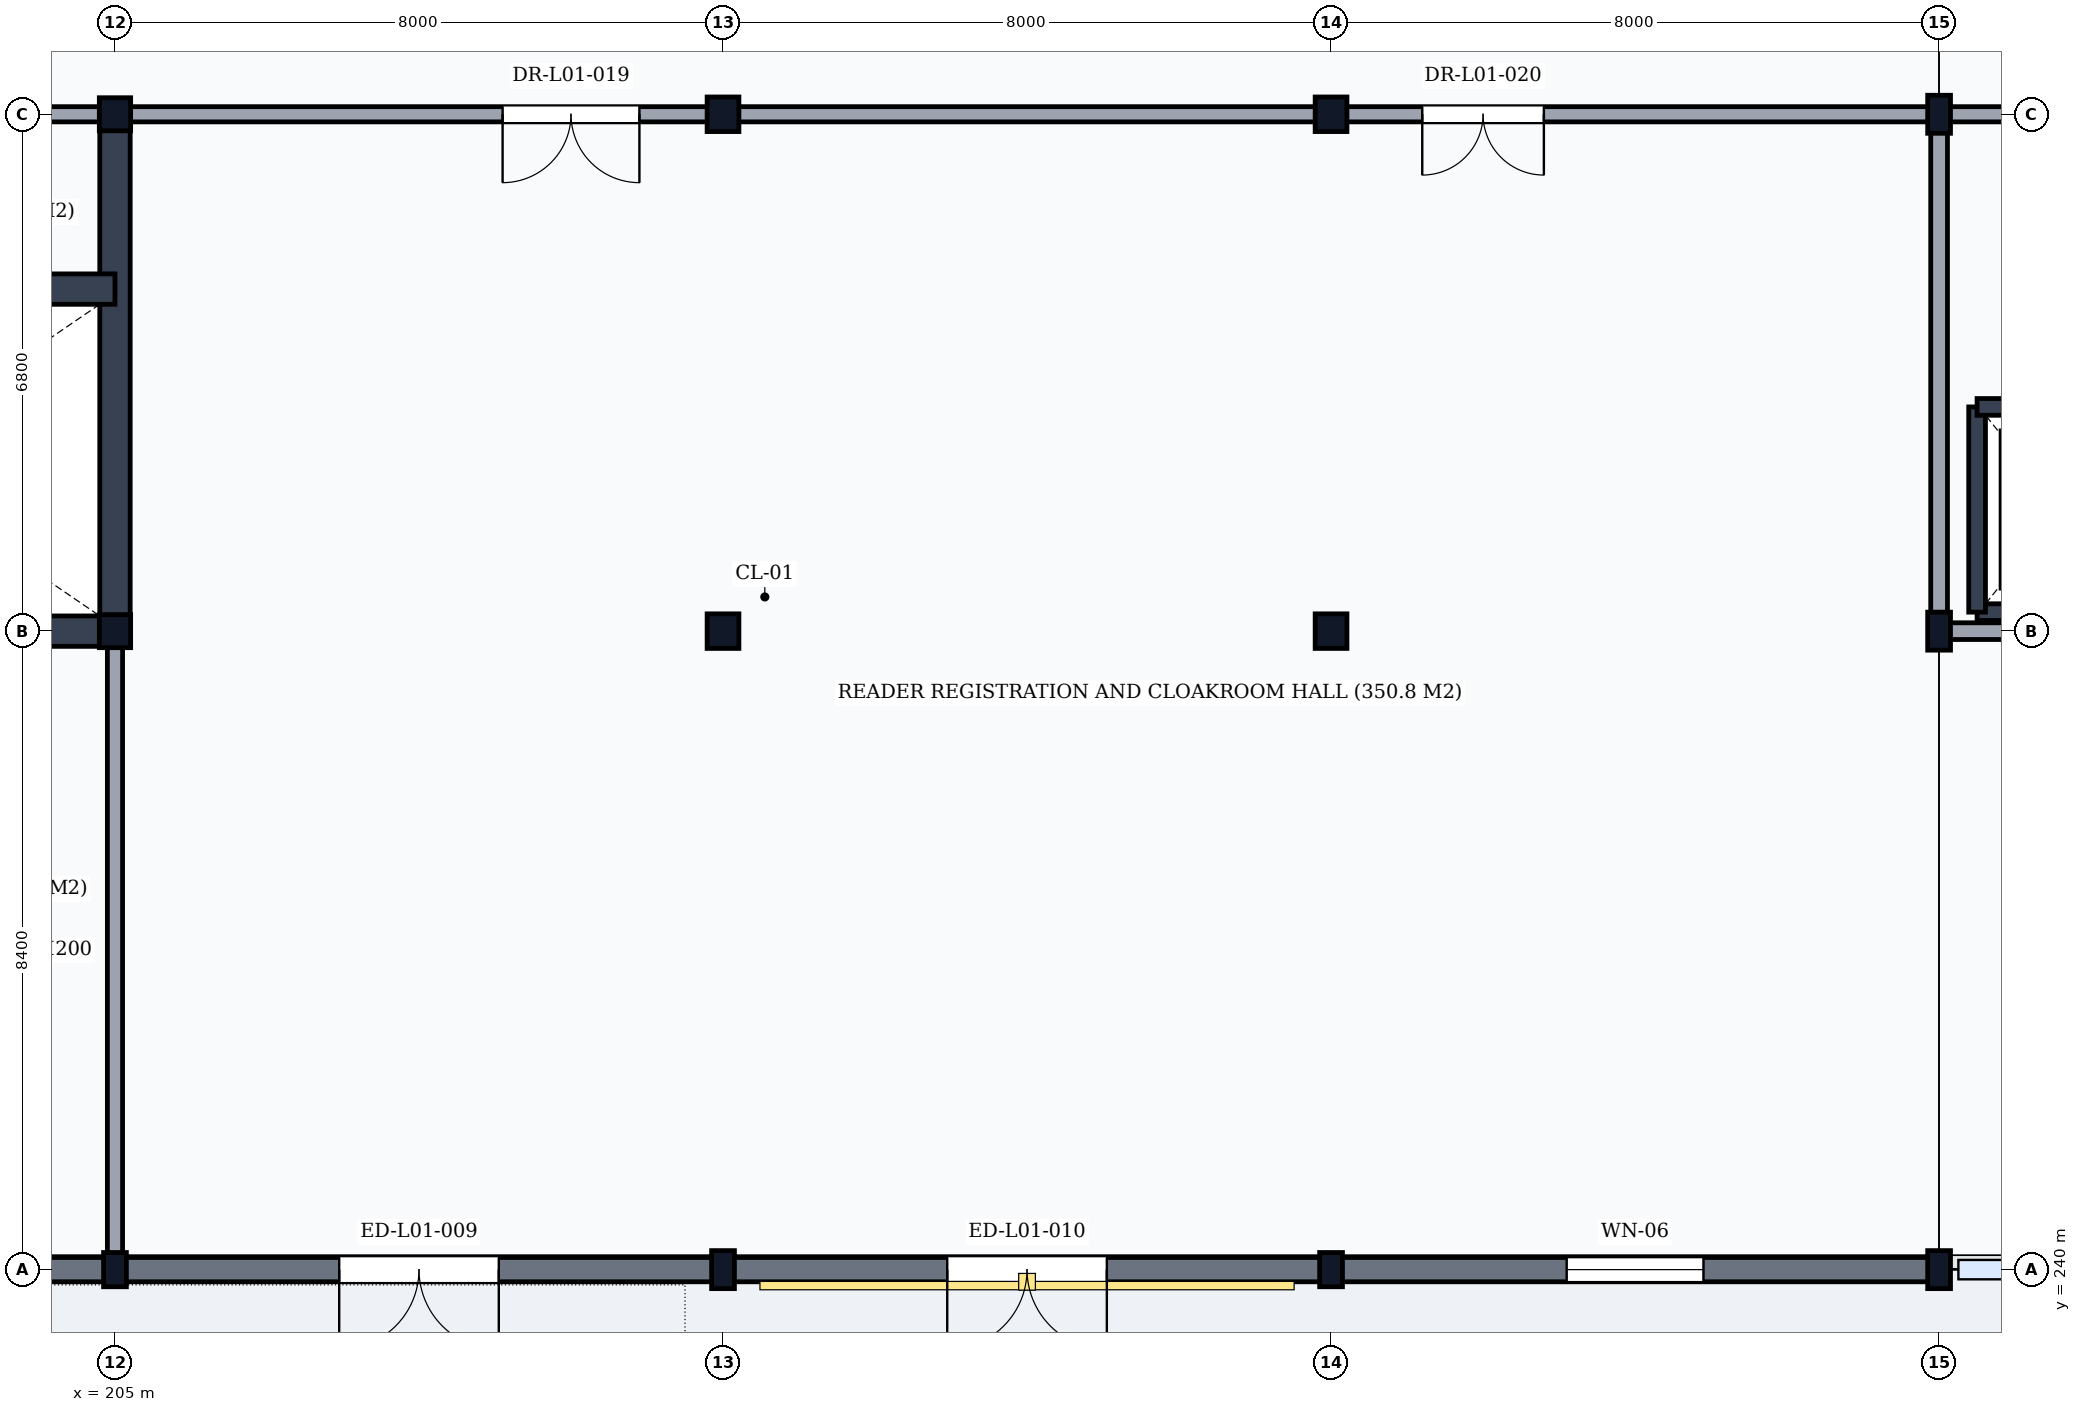
"""IFC4 building model, lengths in metres.
Left out: names, types, materials, properties, quantities, classifications, styles, units other than length and angle.
Written with IfcOpenShell. Run it as: python <this file> out.ifc"""

import sys

from ifc_helpers import new_model, si_unit, direction, frame, frame_2d, origin, origin_2d, place, context, subcontext, project, spatial, rectangle, i_section, extrude, element, fill, save


model = new_model("IFC4")
c1 = context("Model", 3, precision=1e-05, world=origin(), true_north=direction((0.0, 1.0)))
c2 = subcontext(c1, "Body", "Model", "MODEL_VIEW")
j1 = project(units=[si_unit("LENGTHUNIT", "METRE"), si_unit("PLANEANGLEUNIT", "RADIAN")], contexts=[c1])
p1 = place(None, origin())
s1 = spatial("IfcSite", under=j1, at=p1, CompositionType="ELEMENT")
p2 = place(p1, origin())
s2 = spatial("IfcBuilding", under=s1, at=p2, CompositionType="ELEMENT")
p3 = place(p2, origin())
s3 = spatial("IfcBuildingStorey", under=s2, at=p3, CompositionType="ELEMENT", Elevation=0.0)
p4 = place(p3, frame((205.0, 240.0, 0.0), z_axis=(0.0, 0.0, 1.0), x_axis=(1.0, 0.0, 0.0)))
e1 = element("IfcColumn", 1, at=p4, inside=s3, PredefinedType="COLUMN", context=c2, shape_type="SweptSolid", body=[
    extrude(i_section(OverallWidth=0.3, OverallDepth=0.45, WebThickness=0.014, FlangeThickness=0.026, FilletRadius=0.027, at=origin_2d()), origin(), (0.0, 0.0, 1.0), 5.4),
])
for number, where, z_axis, x_axis in (
    (2, (205.0, 248.4, 0.0), (0.0, 0.0, 1.0), (1.0, 0.0, 0.0)),
    (3, (205.0, 255.2, 0.0), (0.0, 0.0, 1.0), (1.0, 0.0, 0.0)),
):
    element("IfcColumn", number, at=place(p3, frame(where, z_axis=z_axis, x_axis=x_axis)), inside=s3, PredefinedType="COLUMN", context=c2, shape_type="SweptSolid", body=[
        extrude(i_section(OverallWidth=0.412, OverallDepth=0.435, WebThickness=0.036, FlangeThickness=0.057, FilletRadius=0.015, at=origin_2d()), origin(), (0.0, 0.0, 1.0), 5.4),
    ])
p5 = place(p3, frame((213.0, 240.0, 0.0), z_axis=(0.0, 0.0, 1.0), x_axis=(1.0, 0.0, 0.0)))
e4 = element("IfcColumn", 4, at=p5, inside=s3, PredefinedType="COLUMN", context=c2, shape_type="SweptSolid", body=[
    extrude(i_section(OverallWidth=0.3, OverallDepth=0.5, WebThickness=0.014, FlangeThickness=0.028, FilletRadius=0.027, at=origin_2d()), origin(), (0.0, 0.0, 1.0), 5.4),
])
for number, where, z_axis, x_axis in (
    (5, (213.0, 248.4, 0.0), (0.0, 0.0, 1.0), (1.0, 0.0, 0.0)),
    (6, (213.0, 255.2, 0.0), (0.0, 0.0, 1.0), (1.0, 0.0, 0.0)),
):
    element("IfcColumn", number, at=place(p3, frame(where, z_axis=z_axis, x_axis=x_axis)), inside=s3, PredefinedType="COLUMN", context=c2, shape_type="SweptSolid", body=[
        extrude(i_section(OverallWidth=0.418, OverallDepth=0.455, WebThickness=0.042, FlangeThickness=0.068, FilletRadius=0.015, at=origin_2d()), origin(), (0.0, 0.0, 1.0), 5.4),
    ])
p6 = place(p3, frame((221.0, 240.0, 0.0), z_axis=(0.0, 0.0, 1.0), x_axis=(1.0, 0.0, 0.0)))
e7 = element("IfcColumn", 7, at=p6, inside=s3, PredefinedType="COLUMN", context=c2, shape_type="SweptSolid", body=[
    extrude(i_section(OverallWidth=0.3, OverallDepth=0.45, WebThickness=0.014, FlangeThickness=0.026, FilletRadius=0.027, at=origin_2d()), origin(), (0.0, 0.0, 1.0), 5.4),
])
for number, where, z_axis, x_axis in (
    (8, (221.0, 248.4, 0.0), (0.0, 0.0, 1.0), (1.0, 0.0, 0.0)),
    (9, (221.0, 255.2, 0.0), (0.0, 0.0, 1.0), (1.0, 0.0, 0.0)),
):
    element("IfcColumn", number, at=place(p3, frame(where, z_axis=z_axis, x_axis=x_axis)), inside=s3, PredefinedType="COLUMN", context=c2, shape_type="SweptSolid", body=[
        extrude(i_section(OverallWidth=0.418, OverallDepth=0.455, WebThickness=0.042, FlangeThickness=0.068, FilletRadius=0.015, at=origin_2d()), origin(), (0.0, 0.0, 1.0), 5.4),
    ])
for number, where, z_axis, x_axis in (
    (10, (229.0, 240.0, 0.0), (0.0, 0.0, 1.0), (1.0, 0.0, 0.0)),
    (11, (229.0, 248.4, 0.0), (0.0, 0.0, 1.0), (1.0, 0.0, 0.0)),
    (12, (229.0, 255.2, 0.0), (0.0, 0.0, 1.0), (1.0, 0.0, 0.0)),
):
    element("IfcColumn", number, at=place(p3, frame(where, z_axis=z_axis, x_axis=x_axis)), inside=s3, PredefinedType="COLUMN", context=c2, shape_type="SweptSolid", body=[
        extrude(i_section(OverallWidth=0.3, OverallDepth=0.5, WebThickness=0.014, FlangeThickness=0.028, FilletRadius=0.027, at=origin_2d()), origin(), (0.0, 0.0, 1.0), 5.4),
    ])
p7 = place(p3, frame((197.006, 240.0, 0.0), z_axis=(0.0, 0.0, 1.0), x_axis=(1.0, 0.0, 0.0)))
e13 = element("IfcWall", 13, at=p7, inside=s3, PredefinedType="SOLIDWALL", context=c2, shape_type="SweptSolid", body=[
    extrude(rectangle(XDim=7.988, YDim=0.32, at=frame_2d((3.994, 0.0))), origin(), (0.0, 0.0, 1.0), 4.838),
])
p8 = place(p7, frame((2.944, 0.0, 0.0)))
e14 = element("IfcOpeningElement", 14, at=p8, cuts=e13, PredefinedType="OPENING", context=c2, shape_type="SweptSolid", body=[
    extrude(rectangle(XDim=2.1, YDim=2.7, at=frame_2d((1.05, 1.35))), frame((0.0, 0.175, 0.0), z_axis=(0.0, -1.0, 0.0), x_axis=(1.0, 0.0, 0.0)), (0.0, 0.0, 1.0), 0.35),
])
p9 = place(p3, frame((205.006, 240.0, 0.0), z_axis=(0.0, 0.0, 1.0), x_axis=(1.0, 0.0, 0.0)))
e15 = element("IfcWall", 15, at=p9, inside=s3, PredefinedType="SOLIDWALL", context=c2, shape_type="SweptSolid", body=[
    extrude(rectangle(XDim=7.988, YDim=0.32, at=frame_2d((3.994, 0.0))), origin(), (0.0, 0.0, 1.0), 4.838),
])
p10 = place(p9, frame((2.944, 0.0, 0.0)))
e16 = element("IfcOpeningElement", 16, at=p10, cuts=e15, PredefinedType="OPENING", context=c2, shape_type="SweptSolid", body=[
    extrude(rectangle(XDim=2.1, YDim=2.7, at=frame_2d((1.05, 1.35))), frame((0.0, 0.175, 0.0), z_axis=(0.0, -1.0, 0.0), x_axis=(1.0, 0.0, 0.0)), (0.0, 0.0, 1.0), 0.35),
])
p11 = place(p3, frame((213.006, 240.0, 0.0), z_axis=(0.0, 0.0, 1.0), x_axis=(1.0, 0.0, 0.0)))
e17 = element("IfcWall", 17, at=p11, inside=s3, PredefinedType="SOLIDWALL", context=c2, shape_type="SweptSolid", body=[
    extrude(rectangle(XDim=7.988, YDim=0.32, at=frame_2d((3.994, 0.0))), origin(), (0.0, 0.0, 1.0), 4.838),
])
p12 = place(p11, frame((2.944, 0.0, 0.0)))
e18 = element("IfcOpeningElement", 18, at=p12, cuts=e17, PredefinedType="OPENING", context=c2, shape_type="SweptSolid", body=[
    extrude(rectangle(XDim=2.1, YDim=2.7, at=frame_2d((1.05, 1.35))), frame((0.0, 0.175, 0.0), z_axis=(0.0, -1.0, 0.0), x_axis=(1.0, 0.0, 0.0)), (0.0, 0.0, 1.0), 0.35),
])
p13 = place(p3, frame((221.006, 240.0, 0.0), z_axis=(0.0, 0.0, 1.0), x_axis=(1.0, 0.0, 0.0)))
e19 = element("IfcWall", 19, at=p13, inside=s3, PredefinedType="SOLIDWALL", context=c2, shape_type="SweptSolid", body=[
    extrude(rectangle(XDim=7.988, YDim=0.32, at=frame_2d((3.994, 0.0))), origin(), (0.0, 0.0, 1.0), 4.838),
])
p14 = place(p13, frame((3.094, 0.0, 0.95)))
e20 = element("IfcOpeningElement", 20, at=p14, cuts=e19, PredefinedType="OPENING", context=c2, shape_type="SweptSolid", body=[
    extrude(rectangle(XDim=1.8, YDim=2.6, at=frame_2d((0.9, 1.3))), frame((0.0, 0.175, 0.0), z_axis=(0.0, -1.0, 0.0), x_axis=(1.0, 0.0, 0.0)), (0.0, 0.0, 1.0), 0.35),
])
p15 = place(p3, frame((120.1, 240.1, 5.4), z_axis=(0.0, 0.0, 1.0), x_axis=(1.0, 0.0, 0.0)))
e21 = element("IfcWall", 21, at=p15, inside=s3, PredefinedType="PARAPET", context=c2, shape_type="SweptSolid", body=[
    extrude(rectangle(XDim=167.8, YDim=0.18, at=frame_2d((83.9, 0.0))), origin(), (0.0, 0.0, 1.0), 1.2),
])
p16 = place(p3, frame((197.0, 248.4, 0.0), z_axis=(0.0, 0.0, 1.0), x_axis=(1.0, 0.0, 0.0)))
e22 = element("IfcWall", 22, at=p16, inside=s3, PredefinedType="SHEAR", context=c2, shape_type="SweptSolid", body=[
    extrude(rectangle(XDim=8.0, YDim=0.4, at=frame_2d((4.0, 0.0))), origin(), (0.0, 0.0, 1.0), 5.14),
])
p17 = place(p16, frame((0.35, 0.0, 0.0)))
e23 = element("IfcOpeningElement", 23, at=p17, cuts=e22, PredefinedType="OPENING", context=c2, shape_type="SweptSolid", body=[
    extrude(rectangle(XDim=1.15, YDim=2.15, at=frame_2d((0.575, 1.075))), frame((0.0, 0.215, 0.0), z_axis=(0.0, -1.0, 0.0), x_axis=(1.0, 0.0, 0.0)), (0.0, 0.0, 1.0), 0.43),
])
p18 = place(p3, frame((205.0, 248.4, 0.0), z_axis=(0.0, 0.0, 1.0), x_axis=(0.0, 1.0, 0.0)))
e24 = element("IfcWall", 24, at=p18, inside=s3, PredefinedType="SHEAR", context=c2, shape_type="SweptSolid", body=[
    extrude(rectangle(XDim=6.8, YDim=0.4, at=frame_2d((3.4, 0.0))), origin(), (0.0, 0.0, 1.0), 5.14),
])
p19 = place(p3, frame((197.0, 252.9, 0.0), z_axis=(0.0, 0.0, 1.0), x_axis=(1.0, 0.0, 0.0)))
e25 = element("IfcWall", 25, at=p19, inside=s3, PredefinedType="SHEAR", context=c2, shape_type="SweptSolid", body=[
    extrude(rectangle(XDim=8.0, YDim=0.4, at=frame_2d((4.0, 0.0))), origin(), (0.0, 0.0, 1.0), 5.14),
])
p20 = place(p19, frame((0.3, 0.0, 0.0)))
e26 = element("IfcOpeningElement", 26, at=p20, cuts=e25, PredefinedType="OPENING", context=c2, shape_type="SweptSolid", body=[
    extrude(rectangle(XDim=1.15, YDim=2.15, at=frame_2d((0.575, 1.075))), frame((0.0, 0.215, 0.0), z_axis=(0.0, -1.0, 0.0), x_axis=(1.0, 0.0, 0.0)), (0.0, 0.0, 1.0), 0.43),
])
p21 = place(p3, frame((197.0, 255.2, 0.0), z_axis=(0.0, 0.0, 1.0), x_axis=(1.0, 0.0, 0.0)))
e27 = element("IfcWall", 27, at=p21, inside=s3, PredefinedType="PARTITIONING", context=c2, shape_type="SweptSolid", body=[
    extrude(rectangle(XDim=8.0, YDim=0.2, at=frame_2d((4.0, 0.0))), origin(), (0.0, 0.0, 1.0), 4.638),
])
p22 = place(p21, frame((3.275, 0.0, 0.0)))
e28 = element("IfcOpeningElement", 28, at=p22, cuts=e27, PredefinedType="OPENING", context=c2, shape_type="SweptSolid", body=[
    extrude(rectangle(XDim=1.45, YDim=2.2, at=frame_2d((0.725, 1.1))), frame((0.0, 0.115, 0.0), z_axis=(0.0, -1.0, 0.0), x_axis=(1.0, 0.0, 0.0)), (0.0, 0.0, 1.0), 0.23),
])
p23 = place(p3, frame((229.5, 248.65, 0.0), z_axis=(0.0, 0.0, 1.0), x_axis=(1.0, 0.0, 0.0)))
e29 = element("IfcWall", 29, at=p23, inside=s3, PredefinedType="SHEAR", context=c2, shape_type="SweptSolid", body=[
    extrude(rectangle(XDim=2.2, YDim=0.22, at=frame_2d((1.1, 0.0))), origin(), (0.0, 0.0, 1.0), 5.14),
])
p24 = place(p3, frame((229.5, 248.65, 0.0), z_axis=(0.0, 0.0, 1.0), x_axis=(0.0, 1.0, 0.0)))
e30 = element("IfcWall", 30, at=p24, inside=s3, PredefinedType="SHEAR", context=c2, shape_type="SweptSolid", body=[
    extrude(rectangle(XDim=2.7, YDim=0.22, at=frame_2d((1.35, 0.0))), origin(), (0.0, 0.0, 1.0), 5.14),
])
p25 = place(p3, frame((229.5, 251.35, 0.0), z_axis=(0.0, 0.0, 1.0), x_axis=(1.0, 0.0, 0.0)))
e31 = element("IfcWall", 31, at=p25, inside=s3, PredefinedType="SHEAR", context=c2, shape_type="SweptSolid", body=[
    extrude(rectangle(XDim=2.2, YDim=0.22, at=frame_2d((1.1, 0.0))), origin(), (0.0, 0.0, 1.0), 5.14),
])
p26 = place(p25, frame((0.5, 0.0, 0.0)))
e32 = element("IfcOpeningElement", 32, at=p26, cuts=e31, PredefinedType="OPENING", context=c2, shape_type="SweptSolid", body=[
    extrude(rectangle(XDim=1.2, YDim=2.2, at=frame_2d((0.6, 1.1))), frame((0.0, 0.125, 0.0), z_axis=(0.0, -1.0, 0.0), x_axis=(1.0, 0.0, 0.0)), (0.0, 0.0, 1.0), 0.25),
])
p27 = place(p3, frame((229.0, 248.4, 0.0), z_axis=(0.0, 0.0, 1.0), x_axis=(0.0, 1.0, 0.0)))
e33 = element("IfcWall", 33, at=p27, inside=s3, PredefinedType="PARTITIONING", context=c2, shape_type="SweptSolid", body=[
    extrude(rectangle(XDim=6.8, YDim=0.22, at=frame_2d((3.4, 0.0))), origin(), (0.0, 0.0, 1.0), 4.778),
])
p28 = place(p3, frame((229.0, 248.4, 0.0), z_axis=(0.0, 0.0, 1.0), x_axis=(1.0, 0.0, 0.0)))
e34 = element("IfcWall", 34, at=p28, inside=s3, PredefinedType="PARTITIONING", context=c2, shape_type="SweptSolid", body=[
    extrude(rectangle(XDim=8.0, YDim=0.22, at=frame_2d((4.0, 0.0))), origin(), (0.0, 0.0, 1.0), 4.688),
])
p29 = place(p3, frame((229.0, 255.2, 0.0), z_axis=(0.0, 0.0, 1.0), x_axis=(1.0, 0.0, 0.0)))
e35 = element("IfcWall", 35, at=p29, inside=s3, PredefinedType="PARTITIONING", context=c2, shape_type="SweptSolid", body=[
    extrude(rectangle(XDim=8.0, YDim=0.2, at=frame_2d((4.0, 0.0))), origin(), (0.0, 0.0, 1.0), 4.688),
])
p30 = place(p29, frame((3.1, 0.0, 0.0)))
e36 = element("IfcOpeningElement", 36, at=p30, cuts=e35, PredefinedType="OPENING", context=c2, shape_type="SweptSolid", body=[
    extrude(rectangle(XDim=1.8, YDim=2.4, at=frame_2d((0.9, 1.2))), frame((0.0, 0.115, 0.0), z_axis=(0.0, -1.0, 0.0), x_axis=(1.0, 0.0, 0.0)), (0.0, 0.0, 1.0), 0.23),
])
p31 = place(p3, frame((205.0, 240.0, 0.0), z_axis=(0.0, 0.0, 1.0), x_axis=(0.0, 1.0, 0.0)))
e37 = element("IfcWall", 37, at=p31, inside=s3, PredefinedType="PARTITIONING", context=c2, shape_type="SweptSolid", body=[
    extrude(rectangle(XDim=8.4, YDim=0.2, at=frame_2d((4.2, 0.0))), origin(), (0.0, 0.0, 1.0), 4.688),
])
p32 = place(p3, frame((205.0, 255.2, 0.0), z_axis=(0.0, 0.0, 1.0), x_axis=(1.0, 0.0, 0.0)))
e38 = element("IfcWall", 38, at=p32, inside=s3, PredefinedType="PARTITIONING", context=c2, shape_type="SweptSolid", body=[
    extrude(rectangle(XDim=24.0, YDim=0.2, at=frame_2d((12.0, 0.0))), origin(), (0.0, 0.0, 1.0), 4.638),
])
p33 = place(p32, frame((5.1, 0.0, 0.0)))
e39 = element("IfcOpeningElement", 39, at=p33, cuts=e38, PredefinedType="OPENING", context=c2, shape_type="SweptSolid", body=[
    extrude(rectangle(XDim=1.8, YDim=2.4, at=frame_2d((0.9, 1.2))), frame((0.0, 0.115, 0.0), z_axis=(0.0, -1.0, 0.0), x_axis=(1.0, 0.0, 0.0)), (0.0, 0.0, 1.0), 0.23),
])
p34 = place(p32, frame((17.2, 0.0, 0.0)))
e40 = element("IfcOpeningElement", 40, at=p34, cuts=e38, PredefinedType="OPENING", context=c2, shape_type="SweptSolid", body=[
    extrude(rectangle(XDim=1.6, YDim=2.25, at=frame_2d((0.8, 1.125))), frame((0.0, 0.115, 0.0), z_axis=(0.0, -1.0, 0.0), x_axis=(1.0, 0.0, 0.0)), (0.0, 0.0, 1.0), 0.23),
])
p35 = place(p10, frame((2.1, 0.0, 0.0), z_axis=(0.0, 0.0, 1.0), x_axis=(-1.0, 0.0, 0.0)))
e41 = element("IfcDoor", 41, at=p35, inside=s3, OperationType="DOUBLE_DOOR_SINGLE_SWING", PredefinedType="DOOR", context=c2, shape_type="SweptSolid", body=[
    extrude(rectangle(XDim=2.1, YDim=2.7, at=frame_2d((1.05, 1.35))), frame((0.0, 0.025, 0.0), z_axis=(0.0, -1.0, 0.0), x_axis=(1.0, 0.0, 0.0)), (0.0, 0.0, 1.0), 0.05),
])
fill(e16, e41)
p36 = place(p12, frame((2.1, 0.0, 0.0), z_axis=(0.0, 0.0, 1.0), x_axis=(-1.0, 0.0, 0.0)))
e42 = element("IfcDoor", 42, at=p36, inside=s3, OperationType="DOUBLE_DOOR_SINGLE_SWING", PredefinedType="DOOR", context=c2, shape_type="SweptSolid", body=[
    extrude(rectangle(XDim=2.1, YDim=2.7, at=frame_2d((1.05, 1.35))), frame((0.0, 0.025, 0.0), z_axis=(0.0, -1.0, 0.0), x_axis=(1.0, 0.0, 0.0)), (0.0, 0.0, 1.0), 0.05),
])
fill(e18, e42)
p37 = place(p14, origin())
e43 = element("IfcWindow", 43, at=p37, inside=s3, PartitioningType="DOUBLE_PANEL_VERTICAL", PredefinedType="WINDOW", context=c2, shape_type="SweptSolid", body=[
    extrude(rectangle(XDim=1.8, YDim=2.6, at=frame_2d((0.9, 1.3))), frame((0.0, 0.03, 0.0), z_axis=(0.0, -1.0, 0.0), x_axis=(1.0, 0.0, 0.0)), (0.0, 0.0, 1.0), 0.06),
])
fill(e20, e43)
p38 = place(p33, frame((1.8, 0.0, 0.0), z_axis=(0.0, 0.0, 1.0), x_axis=(-1.0, 0.0, 0.0)))
e44 = element("IfcDoor", 44, at=p38, inside=s3, OperationType="DOUBLE_DOOR_SINGLE_SWING", PredefinedType="DOOR", context=c2, shape_type="SweptSolid", body=[
    extrude(rectangle(XDim=1.8, YDim=2.4, at=frame_2d((0.9, 1.2))), frame((0.0, 0.025, 0.0), z_axis=(0.0, -1.0, 0.0), x_axis=(1.0, 0.0, 0.0)), (0.0, 0.0, 1.0), 0.05),
])
fill(e39, e44)
p39 = place(p34, frame((1.6, 0.0, 0.0), z_axis=(0.0, 0.0, 1.0), x_axis=(-1.0, 0.0, 0.0)))
e45 = element("IfcDoor", 45, at=p39, inside=s3, OperationType="DOUBLE_DOOR_SINGLE_SWING", PredefinedType="DOOR", context=c2, shape_type="SweptSolid", body=[
    extrude(rectangle(XDim=1.6, YDim=2.25, at=frame_2d((0.8, 1.125))), frame((0.0, 0.025, 0.0), z_axis=(0.0, -1.0, 0.0), x_axis=(1.0, 0.0, 0.0)), (0.0, 0.0, 1.0), 0.05),
])
fill(e40, e45)
save(model, sys.argv[1])
